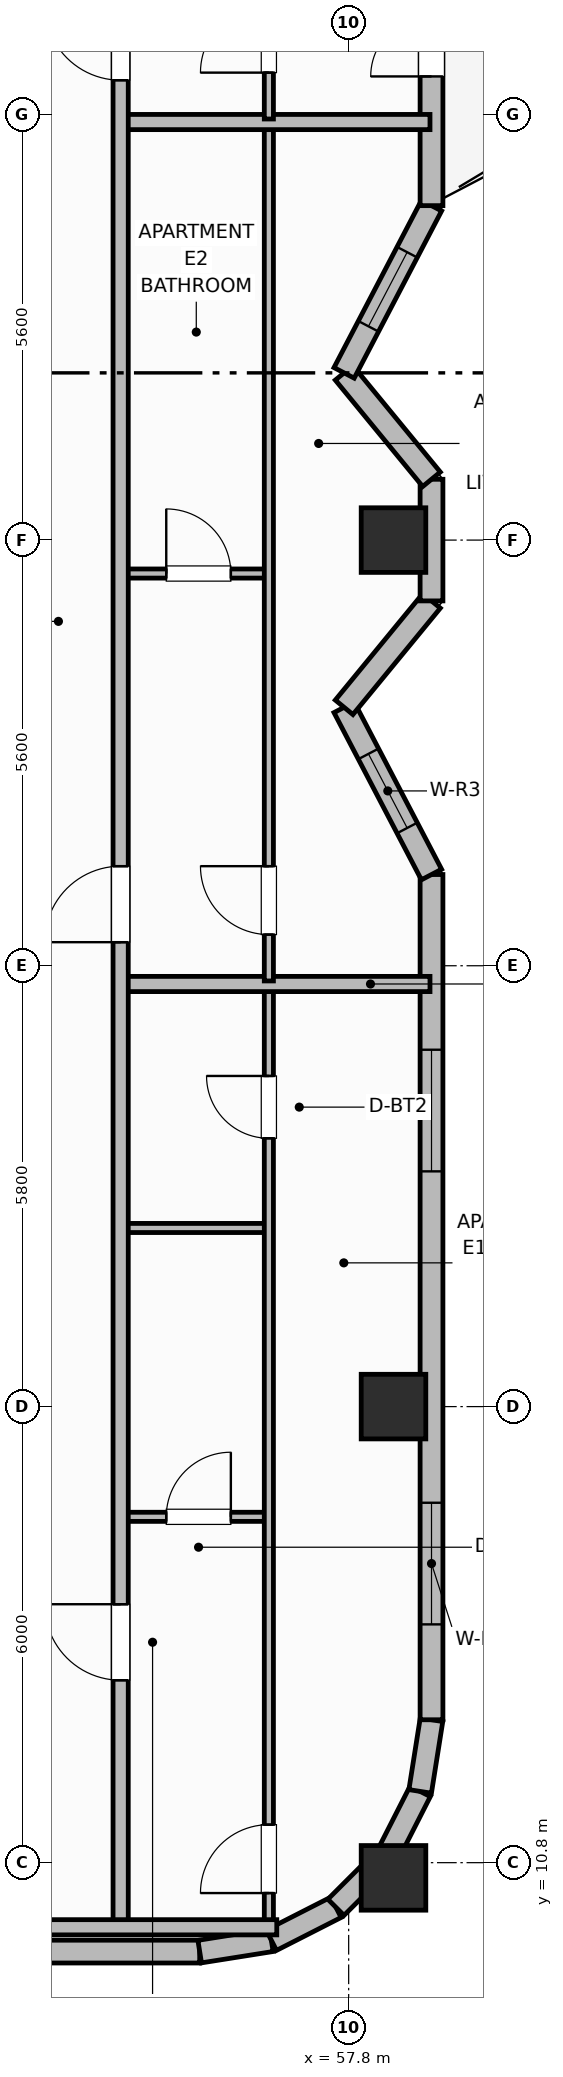
"""IFC4 building model, lengths in metres.
Left out: names, types, materials, properties, quantities, classifications, styles, units other than length and angle.
Written with IfcOpenShell. Run it as: python <this file> out.ifc"""

import sys

from ifc_helpers import new_model, si_unit, direction, frame, frame_2d, origin, origin_2d, place, context, subcontext, project, spatial, rectangle, extrude, element, fill, save


model = new_model("IFC4")
c1 = context("Model", 3, precision=1e-05, world=origin(), true_north=direction((0.0, 1.0)))
c2 = subcontext(c1, "Body", "Model", "MODEL_VIEW")
j1 = project(units=[si_unit("LENGTHUNIT", "METRE"), si_unit("PLANEANGLEUNIT", "RADIAN")], contexts=[c1])
p1 = place(None, origin())
s1 = spatial("IfcSite", under=j1, at=p1, CompositionType="ELEMENT")
p2 = place(p1, origin())
s2 = spatial("IfcBuilding", under=s1, at=p2, CompositionType="ELEMENT")
p3 = place(p2, frame((0.0, 0.0, 240.6)))
s3 = spatial("IfcBuildingStorey", under=s2, at=p3, CompositionType="ELEMENT", Elevation=240.6)
for number, where, z_axis, x_axis in (
    (1, (58.39, 10.6, 0.0), (0.0, 0.0, 1.0), (1.0, 0.0, 0.0)),
    (2, (58.39, 16.8, 0.0), (0.0, 0.0, 1.0), (1.0, 0.0, 0.0)),
    (3, (58.39, 28.2, 0.0), (0.0, 0.0, 1.0), (1.0, 0.0, 0.0)),
):
    element("IfcColumn", number, at=place(p3, frame(where, z_axis=z_axis, x_axis=x_axis)), inside=s3, PredefinedType="COLUMN", context=c2, shape_type="SweptSolid", body=[
        extrude(rectangle(XDim=0.85, YDim=0.85, at=origin_2d()), origin(), (0.0, 0.0, 1.0), 3.7),
    ])
p4 = place(p3, frame((22.56, 9.63, 0.0), z_axis=(0.0, 0.0, 1.0), x_axis=(1.0, 0.0, 0.0)))
e4 = element("IfcWall", 4, at=p4, inside=s3, PredefinedType="SOLIDWALL", context=c2, shape_type="SweptSolid", body=[
    extrude(rectangle(XDim=33.28, YDim=0.3, at=frame_2d((16.64, 0.0))), origin(), (0.0, 0.0, 1.0), 2.73),
])
p5 = place(p4, frame((5.08, 0.0, 0.76)))
e5 = element("IfcOpeningElement", 5, at=p5, cuts=e4, PredefinedType="OPENING", context=c2, shape_type="SweptSolid", body=[
    extrude(rectangle(XDim=1.8, YDim=1.85, at=frame_2d((0.9, 0.925))), frame((0.0, 0.16, 0.0), z_axis=(0.0, -1.0, 0.0), x_axis=(1.0, 0.0, 0.0)), (0.0, 0.0, 1.0), 0.32),
])
p6 = place(p4, frame((8.633, 0.0, 0.76)))
e6 = element("IfcOpeningElement", 6, at=p6, cuts=e4, PredefinedType="OPENING", context=c2, shape_type="SweptSolid", body=[
    extrude(rectangle(XDim=1.8, YDim=1.85, at=frame_2d((0.9, 0.925))), frame((0.0, 0.16, 0.0), z_axis=(0.0, -1.0, 0.0), x_axis=(1.0, 0.0, 0.0)), (0.0, 0.0, 1.0), 0.32),
])
p7 = place(p4, frame((15.74, 0.0, 0.76)))
e7 = element("IfcOpeningElement", 7, at=p7, cuts=e4, PredefinedType="OPENING", context=c2, shape_type="SweptSolid", body=[
    extrude(rectangle(XDim=1.8, YDim=1.85, at=frame_2d((0.9, 0.925))), frame((0.0, 0.16, 0.0), z_axis=(0.0, -1.0, 0.0), x_axis=(1.0, 0.0, 0.0)), (0.0, 0.0, 1.0), 0.32),
])
p8 = place(p4, frame((22.847, 0.0, 0.76)))
e8 = element("IfcOpeningElement", 8, at=p8, cuts=e4, PredefinedType="OPENING", context=c2, shape_type="SweptSolid", body=[
    extrude(rectangle(XDim=1.8, YDim=1.85, at=frame_2d((0.9, 0.925))), frame((0.0, 0.16, 0.0), z_axis=(0.0, -1.0, 0.0), x_axis=(1.0, 0.0, 0.0)), (0.0, 0.0, 1.0), 0.32),
])
p9 = place(p4, frame((26.4, 0.0, 0.76)))
e9 = element("IfcOpeningElement", 9, at=p9, cuts=e4, PredefinedType="OPENING", context=c2, shape_type="SweptSolid", body=[
    extrude(rectangle(XDim=1.8, YDim=1.85, at=frame_2d((0.9, 0.925))), frame((0.0, 0.16, 0.0), z_axis=(0.0, -1.0, 0.0), x_axis=(1.0, 0.0, 0.0)), (0.0, 0.0, 1.0), 0.32),
])
p10 = place(p3, frame((55.84, 9.63, 0.0), z_axis=(0.0, 0.0, 1.0), x_axis=(0.987663181641, 0.156593229835, 0.0)))
e10 = element("IfcWall", 10, at=p10, inside=s3, PredefinedType="SOLIDWALL", context=c2, shape_type="SweptSolid", body=[
    extrude(rectangle(XDim=0.954, YDim=0.3, at=frame_2d((0.477, 0.0))), origin(), (0.0, 0.0, 1.0), 2.73),
])
for number, where, z_axis, x_axis in (
    (11, (56.782, 9.779, 0.0), (0.0, 0.0, 1.0), (0.891, 0.454, 0.0)),
    (12, (57.633, 10.212, 0.0), (0.0, 0.0, 1.0), (0.707, 0.707, 0.0)),
    (13, (58.308, 10.887, 0.0), (0.0, 0.0, 1.0), (0.454, 0.891, 0.0)),
):
    element("IfcWall", number, at=place(p3, frame(where, z_axis=z_axis, x_axis=x_axis)), inside=s3, PredefinedType="SOLIDWALL", context=c2, shape_type="SweptSolid", body=[
        extrude(rectangle(XDim=0.954, YDim=0.3, at=frame_2d((0.477, 0.0))), origin(), (0.0, 0.0, 1.0), 2.73),
    ])
p11 = place(p3, frame((58.741, 11.738, 0.0), z_axis=(0.0, 0.0, 1.0), x_axis=(0.156343617883, 0.987702725088, 0.0)))
e14 = element("IfcWall", 14, at=p11, inside=s3, PredefinedType="SOLIDWALL", context=c2, shape_type="SweptSolid", body=[
    extrude(rectangle(XDim=0.954, YDim=0.3, at=frame_2d((0.477, 0.0))), origin(), (0.0, 0.0, 1.0), 2.73),
])
p12 = place(p3, frame((58.89, 12.68, 0.0), z_axis=(0.0, 0.0, 1.0), x_axis=(0.0, 1.0, 0.0)))
e15 = element("IfcWall", 15, at=p12, inside=s3, PredefinedType="SOLIDWALL", context=c2, shape_type="SweptSolid", body=[
    extrude(rectangle(XDim=11.12, YDim=0.3, at=frame_2d((5.56, 0.0))), origin(), (0.0, 0.0, 1.0), 2.73),
])
p13 = place(p12, frame((1.255, 0.0, 0.71)))
e16 = element("IfcOpeningElement", 16, at=p13, cuts=e15, PredefinedType="OPENING", context=c2, shape_type="SweptSolid", body=[
    extrude(rectangle(XDim=1.6, YDim=1.9, at=frame_2d((0.8, 0.95))), frame((0.0, 0.16, 0.0), z_axis=(0.0, -1.0, 0.0), x_axis=(1.0, 0.0, 0.0)), (0.0, 0.0, 1.0), 0.32),
])
p14 = place(p12, frame((7.215, 0.0, 0.71)))
e17 = element("IfcOpeningElement", 17, at=p14, cuts=e15, PredefinedType="OPENING", context=c2, shape_type="SweptSolid", body=[
    extrude(rectangle(XDim=1.6, YDim=1.9, at=frame_2d((0.8, 0.95))), frame((0.0, 0.16, 0.0), z_axis=(0.0, -1.0, 0.0), x_axis=(1.0, 0.0, 0.0)), (0.0, 0.0, 1.0), 0.32),
])
p15 = place(p3, frame((58.89, 23.8, 0.0), z_axis=(0.0, 0.0, 1.0), x_axis=(-0.46323138706, 0.886237373418, 0.0)))
e18 = element("IfcWall", 18, at=p15, inside=s3, PredefinedType="SOLIDWALL", context=c2, shape_type="SweptSolid", body=[
    extrude(rectangle(XDim=2.482, YDim=0.3, at=frame_2d((1.241, 0.0))), origin(), (0.0, 0.0, 1.0), 2.73),
])
p16 = place(p15, frame((0.691, 0.0, 0.92)))
e19 = element("IfcOpeningElement", 19, at=p16, cuts=e18, PredefinedType="OPENING", context=c2, shape_type="SweptSolid", body=[
    extrude(rectangle(XDim=1.1, YDim=1.65, at=frame_2d((0.55, 0.825))), frame((0.0, 0.16, 0.0), z_axis=(0.0, -1.0, 0.0), x_axis=(1.0, 0.0, 0.0)), (0.0, 0.0, 1.0), 0.32),
])
p17 = place(p3, frame((57.74, 26.0, 0.0), z_axis=(0.0, 0.0, 1.0), x_axis=(0.634733675645, 0.772730975827, 0.0)))
e20 = element("IfcWall", 20, at=p17, inside=s3, PredefinedType="SOLIDWALL", context=c2, shape_type="SweptSolid", body=[
    extrude(rectangle(XDim=1.812, YDim=0.3, at=frame_2d((0.906, 0.0))), origin(), (0.0, 0.0, 1.0), 2.73),
])
p18 = place(p3, frame((58.89, 27.4, 0.0), z_axis=(0.0, 0.0, 1.0), x_axis=(0.0, 1.0, 0.0)))
e21 = element("IfcWall", 21, at=p18, inside=s3, PredefinedType="SOLIDWALL", context=c2, shape_type="SweptSolid", body=[
    extrude(rectangle(XDim=1.6, YDim=0.3, at=frame_2d((0.8, 0.0))), origin(), (0.0, 0.0, 1.0), 2.73),
])
p19 = place(p3, frame((58.89, 29.0, 0.0), z_axis=(0.0, 0.0, 1.0), x_axis=(-0.634733675645, 0.772730975827, 0.0)))
e22 = element("IfcWall", 22, at=p19, inside=s3, PredefinedType="SOLIDWALL", context=c2, shape_type="SweptSolid", body=[
    extrude(rectangle(XDim=1.812, YDim=0.3, at=frame_2d((0.906, 0.0))), origin(), (0.0, 0.0, 1.0), 2.73),
])
p20 = place(p3, frame((57.74, 30.4, 0.0), z_axis=(0.0, 0.0, 1.0), x_axis=(0.463191013929, 0.88625847506, 0.0)))
e23 = element("IfcWall", 23, at=p20, inside=s3, PredefinedType="SOLIDWALL", context=c2, shape_type="SweptSolid", body=[
    extrude(rectangle(XDim=2.483, YDim=0.3, at=frame_2d((1.241, 0.0))), origin(), (0.0, 0.0, 1.0), 2.73),
])
p21 = place(p20, frame((0.691, 0.0, 0.92)))
e24 = element("IfcOpeningElement", 24, at=p21, cuts=e23, PredefinedType="OPENING", context=c2, shape_type="SweptSolid", body=[
    extrude(rectangle(XDim=1.1, YDim=1.65, at=frame_2d((0.55, 0.825))), frame((0.0, 0.16, 0.0), z_axis=(0.0, -1.0, 0.0), x_axis=(1.0, 0.0, 0.0)), (0.0, 0.0, 1.0), 0.32),
])
p22 = place(p3, frame((58.89, 32.6, 0.0), z_axis=(0.0, 0.0, 1.0), x_axis=(0.0, 1.0, 0.0)))
e25 = element("IfcWall", 25, at=p22, inside=s3, PredefinedType="SOLIDWALL", context=c2, shape_type="SweptSolid", body=[
    extrude(rectangle(XDim=11.12, YDim=0.3, at=frame_2d((5.56, 0.0))), origin(), (0.0, 0.0, 1.0), 2.73),
])
p23 = place(p22, frame((1.7, 0.0, 0.0)))
e26 = element("IfcOpeningElement", 26, at=p23, cuts=e25, PredefinedType="OPENING", context=c2, shape_type="SweptSolid", body=[
    extrude(rectangle(XDim=1.6, YDim=2.1, at=frame_2d((0.8, 1.05))), frame((0.0, 0.16, 0.0), z_axis=(0.0, -1.0, 0.0), x_axis=(1.0, 0.0, 0.0)), (0.0, 0.0, 1.0), 0.32),
])
p24 = place(p22, frame((4.16, 0.0, 0.76)))
e27 = element("IfcOpeningElement", 27, at=p24, cuts=e25, PredefinedType="OPENING", context=c2, shape_type="SweptSolid", body=[
    extrude(rectangle(XDim=1.4, YDim=1.85, at=frame_2d((0.7, 0.925))), frame((0.0, 0.16, 0.0), z_axis=(0.0, -1.0, 0.0), x_axis=(1.0, 0.0, 0.0)), (0.0, 0.0, 1.0), 0.32),
])
p25 = place(p22, frame((8.483, 0.0, 0.76)))
e28 = element("IfcOpeningElement", 28, at=p25, cuts=e25, PredefinedType="OPENING", context=c2, shape_type="SweptSolid", body=[
    extrude(rectangle(XDim=1.4, YDim=1.85, at=frame_2d((0.7, 0.925))), frame((0.0, 0.16, 0.0), z_axis=(0.0, -1.0, 0.0), x_axis=(1.0, 0.0, 0.0)), (0.0, 0.0, 1.0), 0.32),
])
p26 = place(p3, frame((54.8, 15.35, 0.0), z_axis=(0.0, 0.0, 1.0), x_axis=(1.0, 0.0, 0.0)))
e29 = element("IfcWall", 29, at=p26, inside=s3, PredefinedType="PARTITIONING", context=c2, shape_type="SweptSolid", body=[
    extrude(rectangle(XDim=1.95, YDim=0.12, at=frame_2d((0.975, 0.0))), origin(), (0.0, 0.0, 1.0), 2.56),
])
p27 = place(p26, frame((0.6, 0.0, 0.0)))
e30 = element("IfcOpeningElement", 30, at=p27, cuts=e29, PredefinedType="OPENING", context=c2, shape_type="SweptSolid", body=[
    extrude(rectangle(XDim=0.85, YDim=2.1, at=frame_2d((0.425, 1.05))), frame((0.0, 0.07, 0.0), z_axis=(0.0, -1.0, 0.0), x_axis=(1.0, 0.0, 0.0)), (0.0, 0.0, 1.0), 0.14),
])
p28 = place(p3, frame((54.8, 19.15, 0.0), z_axis=(0.0, 0.0, 1.0), x_axis=(1.0, 0.0, 0.0)))
e31 = element("IfcWall", 31, at=p28, inside=s3, PredefinedType="PARTITIONING", context=c2, shape_type="SweptSolid", body=[
    extrude(rectangle(XDim=1.95, YDim=0.12, at=frame_2d((0.975, 0.0))), origin(), (0.0, 0.0, 1.0), 2.56),
])
p29 = place(p3, frame((56.75, 9.99, 0.0), z_axis=(0.0, 0.0, 1.0), x_axis=(0.0, 1.0, 0.0)))
e32 = element("IfcWall", 32, at=p29, inside=s3, PredefinedType="PARTITIONING", context=c2, shape_type="SweptSolid", body=[
    extrude(rectangle(XDim=12.33, YDim=0.12, at=frame_2d((6.165, 0.0))), origin(), (0.0, 0.0, 1.0), 2.56),
])
p30 = place(p29, frame((0.41, 0.0, 0.0)))
e33 = element("IfcOpeningElement", 33, at=p30, cuts=e32, PredefinedType="OPENING", context=c2, shape_type="SweptSolid", body=[
    extrude(rectangle(XDim=0.9, YDim=2.1, at=frame_2d((0.45, 1.05))), frame((0.0, 0.07, 0.0), z_axis=(0.0, -1.0, 0.0), x_axis=(1.0, 0.0, 0.0)), (0.0, 0.0, 1.0), 0.14),
])
p31 = place(p29, frame((10.34, 0.0, 0.0)))
e34 = element("IfcOpeningElement", 34, at=p31, cuts=e32, PredefinedType="OPENING", context=c2, shape_type="SweptSolid", body=[
    extrude(rectangle(XDim=0.82, YDim=2.08, at=frame_2d((0.41, 1.04))), frame((0.0, 0.07, 0.0), z_axis=(0.0, -1.0, 0.0), x_axis=(1.0, 0.0, 0.0)), (0.0, 0.0, 1.0), 0.14),
])
p32 = place(p3, frame((54.8, 22.36, 0.0), z_axis=(0.0, 0.0, 1.0), x_axis=(1.0, 0.0, 0.0)))
e35 = element("IfcWall", 35, at=p32, inside=s3, PredefinedType="PARTITIONING", context=c2, shape_type="SweptSolid", body=[
    extrude(rectangle(XDim=4.07, YDim=0.2, at=frame_2d((2.035, 0.0))), origin(), (0.0, 0.0, 1.0), 2.56),
])
p33 = place(p3, frame((54.8, 27.76, 0.0), z_axis=(0.0, 0.0, 1.0), x_axis=(1.0, 0.0, 0.0)))
e36 = element("IfcWall", 36, at=p33, inside=s3, PredefinedType="PARTITIONING", context=c2, shape_type="SweptSolid", body=[
    extrude(rectangle(XDim=1.95, YDim=0.12, at=frame_2d((0.975, 0.0))), origin(), (0.0, 0.0, 1.0), 2.56),
])
p34 = place(p33, frame((0.6, 0.0, 0.0)))
e37 = element("IfcOpeningElement", 37, at=p34, cuts=e36, PredefinedType="OPENING", context=c2, shape_type="SweptSolid", body=[
    extrude(rectangle(XDim=0.85, YDim=2.1, at=frame_2d((0.425, 1.05))), frame((0.0, 0.07, 0.0), z_axis=(0.0, -1.0, 0.0), x_axis=(1.0, 0.0, 0.0)), (0.0, 0.0, 1.0), 0.14),
])
p35 = place(p3, frame((56.75, 22.4, 0.0), z_axis=(0.0, 0.0, 1.0), x_axis=(0.0, 1.0, 0.0)))
e38 = element("IfcWall", 38, at=p35, inside=s3, PredefinedType="PARTITIONING", context=c2, shape_type="SweptSolid", body=[
    extrude(rectangle(XDim=11.26, YDim=0.12, at=frame_2d((5.63, 0.0))), origin(), (0.0, 0.0, 1.0), 2.56),
])
p36 = place(p35, frame((0.61, 0.0, 0.0)))
e39 = element("IfcOpeningElement", 39, at=p36, cuts=e38, PredefinedType="OPENING", context=c2, shape_type="SweptSolid", body=[
    extrude(rectangle(XDim=0.9, YDim=2.1, at=frame_2d((0.45, 1.05))), frame((0.0, 0.07, 0.0), z_axis=(0.0, -1.0, 0.0), x_axis=(1.0, 0.0, 0.0)), (0.0, 0.0, 1.0), 0.14),
])
p37 = place(p3, frame((54.8, 33.7, 0.0), z_axis=(0.0, 0.0, 1.0), x_axis=(1.0, 0.0, 0.0)))
e40 = element("IfcWall", 40, at=p37, inside=s3, PredefinedType="PARTITIONING", context=c2, shape_type="SweptSolid", body=[
    extrude(rectangle(XDim=4.07, YDim=0.2, at=frame_2d((2.035, 0.0))), origin(), (0.0, 0.0, 1.0), 2.56),
])
p38 = place(p3, frame((56.75, 33.74, 0.0), z_axis=(0.0, 0.0, 1.0), x_axis=(0.0, 1.0, 0.0)))
e41 = element("IfcWall", 41, at=p38, inside=s3, PredefinedType="PARTITIONING", context=c2, shape_type="SweptSolid", body=[
    extrude(rectangle(XDim=12.67, YDim=0.12, at=frame_2d((6.335, 0.0))), origin(), (0.0, 0.0, 1.0), 2.56),
])
p39 = place(p38, frame((0.61, 0.0, 0.0)))
e42 = element("IfcOpeningElement", 42, at=p39, cuts=e41, PredefinedType="OPENING", context=c2, shape_type="SweptSolid", body=[
    extrude(rectangle(XDim=0.9, YDim=2.1, at=frame_2d((0.45, 1.05))), frame((0.0, 0.07, 0.0), z_axis=(0.0, -1.0, 0.0), x_axis=(1.0, 0.0, 0.0)), (0.0, 0.0, 1.0), 0.14),
])
p40 = place(p38, frame((10.51, 0.0, 0.0)))
e43 = element("IfcOpeningElement", 43, at=p40, cuts=e41, PredefinedType="OPENING", context=c2, shape_type="SweptSolid", body=[
    extrude(rectangle(XDim=0.82, YDim=2.08, at=frame_2d((0.41, 1.04))), frame((0.0, 0.07, 0.0), z_axis=(0.0, -1.0, 0.0), x_axis=(1.0, 0.0, 0.0)), (0.0, 0.0, 1.0), 0.14),
])
p41 = place(p3, frame((54.8, 9.95, 0.0), z_axis=(0.0, 0.0, 1.0), x_axis=(0.0, 1.0, 0.0)))
e44 = element("IfcWall", 44, at=p41, inside=s3, PredefinedType="PARTITIONING", context=c2, shape_type="SweptSolid", body=[
    extrude(rectangle(XDim=36.5, YDim=0.2, at=frame_2d((18.25, 0.0))), origin(), (0.0, 0.0, 1.0), 2.56),
])
p42 = place(p41, frame((3.25, 0.0, 0.0)))
e45 = element("IfcOpeningElement", 45, at=p42, cuts=e44, PredefinedType="OPENING", context=c2, shape_type="SweptSolid", body=[
    extrude(rectangle(XDim=1.0, YDim=2.15, at=frame_2d((0.5, 1.075))), frame((0.0, 0.11, 0.0), z_axis=(0.0, -1.0, 0.0), x_axis=(1.0, 0.0, 0.0)), (0.0, 0.0, 1.0), 0.22),
])
p43 = place(p41, frame((12.96, 0.0, 0.0)))
e46 = element("IfcOpeningElement", 46, at=p43, cuts=e44, PredefinedType="OPENING", context=c2, shape_type="SweptSolid", body=[
    extrude(rectangle(XDim=1.0, YDim=2.15, at=frame_2d((0.5, 1.075))), frame((0.0, 0.11, 0.0), z_axis=(0.0, -1.0, 0.0), x_axis=(1.0, 0.0, 0.0)), (0.0, 0.0, 1.0), 0.22),
])
p44 = place(p41, frame((24.3, 0.0, 0.0)))
e47 = element("IfcOpeningElement", 47, at=p44, cuts=e44, PredefinedType="OPENING", context=c2, shape_type="SweptSolid", body=[
    extrude(rectangle(XDim=1.0, YDim=2.15, at=frame_2d((0.5, 1.075))), frame((0.0, 0.11, 0.0), z_axis=(0.0, -1.0, 0.0), x_axis=(1.0, 0.0, 0.0)), (0.0, 0.0, 1.0), 0.22),
])
p45 = place(p3, frame((53.1, 9.95, 0.0), z_axis=(0.0, 0.0, 1.0), x_axis=(1.0, 0.0, 0.0)))
e48 = element("IfcWall", 48, at=p45, inside=s3, PredefinedType="PARTITIONING", context=c2, shape_type="SweptSolid", body=[
    extrude(rectangle(XDim=3.754, YDim=0.2, at=frame_2d((1.877, 0.0))), origin(), (0.0, 0.0, 1.0), 2.56),
])
p46 = place(p13, origin())
e49 = element("IfcWindow", 49, at=p46, inside=s3, PartitioningType="SINGLE_PANEL", PredefinedType="WINDOW", context=c2, shape_type="SweptSolid", body=[
    extrude(rectangle(XDim=1.6, YDim=1.9, at=frame_2d((0.8, 0.95))), frame((0.0, 0.03, 0.0), z_axis=(0.0, -1.0, 0.0), x_axis=(1.0, 0.0, 0.0)), (0.0, 0.0, 1.0), 0.06),
])
fill(e16, e49)
p47 = place(p14, origin())
e50 = element("IfcWindow", 50, at=p47, inside=s3, PartitioningType="SINGLE_PANEL", PredefinedType="WINDOW", context=c2, shape_type="SweptSolid", body=[
    extrude(rectangle(XDim=1.6, YDim=1.9, at=frame_2d((0.8, 0.95))), frame((0.0, 0.03, 0.0), z_axis=(0.0, -1.0, 0.0), x_axis=(1.0, 0.0, 0.0)), (0.0, 0.0, 1.0), 0.06),
])
fill(e17, e50)
p48 = place(p16, origin())
e51 = element("IfcWindow", 51, at=p48, inside=s3, PartitioningType="SINGLE_PANEL", PredefinedType="WINDOW", context=c2, shape_type="SweptSolid", body=[
    extrude(rectangle(XDim=1.1, YDim=1.65, at=frame_2d((0.55, 0.825))), frame((0.0, 0.03, 0.0), z_axis=(0.0, -1.0, 0.0), x_axis=(1.0, 0.0, 0.0)), (0.0, 0.0, 1.0), 0.06),
])
fill(e19, e51)
p49 = place(p21, origin())
e52 = element("IfcWindow", 52, at=p49, inside=s3, PartitioningType="SINGLE_PANEL", PredefinedType="WINDOW", context=c2, shape_type="SweptSolid", body=[
    extrude(rectangle(XDim=1.1, YDim=1.65, at=frame_2d((0.55, 0.825))), frame((0.0, 0.03, 0.0), z_axis=(0.0, -1.0, 0.0), x_axis=(1.0, 0.0, 0.0)), (0.0, 0.0, 1.0), 0.06),
])
fill(e24, e52)
p50 = place(p23, origin())
e53 = element("IfcDoor", 53, at=p50, inside=s3, OperationType="DOUBLE_DOOR_SINGLE_SWING", PredefinedType="DOOR", context=c2, shape_type="SweptSolid", body=[
    extrude(rectangle(XDim=1.6, YDim=2.1, at=frame_2d((0.8, 1.05))), frame((0.0, 0.025, 0.0), z_axis=(0.0, -1.0, 0.0), x_axis=(1.0, 0.0, 0.0)), (0.0, 0.0, 1.0), 0.05),
])
fill(e26, e53)
p51 = place(p27, origin())
e54 = element("IfcDoor", 54, at=p51, inside=s3, OperationType="SINGLE_SWING_RIGHT", PredefinedType="DOOR", context=c2, shape_type="SweptSolid", body=[
    extrude(rectangle(XDim=0.85, YDim=2.1, at=frame_2d((0.425, 1.05))), frame((0.0, 0.025, 0.0), z_axis=(0.0, -1.0, 0.0), x_axis=(1.0, 0.0, 0.0)), (0.0, 0.0, 1.0), 0.05),
])
fill(e30, e54)
p52 = place(p30, origin())
e55 = element("IfcDoor", 55, at=p52, inside=s3, OperationType="SINGLE_SWING_LEFT", PredefinedType="DOOR", context=c2, shape_type="SweptSolid", body=[
    extrude(rectangle(XDim=0.9, YDim=2.1, at=frame_2d((0.45, 1.05))), frame((0.0, 0.025, 0.0), z_axis=(0.0, -1.0, 0.0), x_axis=(1.0, 0.0, 0.0)), (0.0, 0.0, 1.0), 0.05),
])
fill(e33, e55)
p53 = place(p31, origin())
e56 = element("IfcDoor", 56, at=p53, inside=s3, OperationType="SINGLE_SWING_RIGHT", PredefinedType="DOOR", context=c2, shape_type="SweptSolid", body=[
    extrude(rectangle(XDim=0.82, YDim=2.08, at=frame_2d((0.41, 1.04))), frame((0.0, 0.025, 0.0), z_axis=(0.0, -1.0, 0.0), x_axis=(1.0, 0.0, 0.0)), (0.0, 0.0, 1.0), 0.05),
])
fill(e34, e56)
p54 = place(p34, origin())
e57 = element("IfcDoor", 57, at=p54, inside=s3, OperationType="SINGLE_SWING_LEFT", PredefinedType="DOOR", context=c2, shape_type="SweptSolid", body=[
    extrude(rectangle(XDim=0.85, YDim=2.1, at=frame_2d((0.425, 1.05))), frame((0.0, 0.025, 0.0), z_axis=(0.0, -1.0, 0.0), x_axis=(1.0, 0.0, 0.0)), (0.0, 0.0, 1.0), 0.05),
])
fill(e37, e57)
p55 = place(p36, origin())
e58 = element("IfcDoor", 58, at=p55, inside=s3, OperationType="SINGLE_SWING_RIGHT", PredefinedType="DOOR", context=c2, shape_type="SweptSolid", body=[
    extrude(rectangle(XDim=0.9, YDim=2.1, at=frame_2d((0.45, 1.05))), frame((0.0, 0.025, 0.0), z_axis=(0.0, -1.0, 0.0), x_axis=(1.0, 0.0, 0.0)), (0.0, 0.0, 1.0), 0.05),
])
fill(e39, e58)
p56 = place(p39, origin())
e59 = element("IfcDoor", 59, at=p56, inside=s3, OperationType="SINGLE_SWING_LEFT", PredefinedType="DOOR", context=c2, shape_type="SweptSolid", body=[
    extrude(rectangle(XDim=0.9, YDim=2.1, at=frame_2d((0.45, 1.05))), frame((0.0, 0.025, 0.0), z_axis=(0.0, -1.0, 0.0), x_axis=(1.0, 0.0, 0.0)), (0.0, 0.0, 1.0), 0.05),
])
fill(e42, e59)
p57 = place(p42, origin())
e60 = element("IfcDoor", 60, at=p57, inside=s3, OperationType="SINGLE_SWING_RIGHT", PredefinedType="DOOR", context=c2, shape_type="SweptSolid", body=[
    extrude(rectangle(XDim=1.0, YDim=2.15, at=frame_2d((0.5, 1.075))), frame((0.0, 0.025, 0.0), z_axis=(0.0, -1.0, 0.0), x_axis=(1.0, 0.0, 0.0)), (0.0, 0.0, 1.0), 0.05),
])
fill(e45, e60)
p58 = place(p43, origin())
e61 = element("IfcDoor", 61, at=p58, inside=s3, OperationType="SINGLE_SWING_LEFT", PredefinedType="DOOR", context=c2, shape_type="SweptSolid", body=[
    extrude(rectangle(XDim=1.0, YDim=2.15, at=frame_2d((0.5, 1.075))), frame((0.0, 0.025, 0.0), z_axis=(0.0, -1.0, 0.0), x_axis=(1.0, 0.0, 0.0)), (0.0, 0.0, 1.0), 0.05),
])
fill(e46, e61)
p59 = place(p44, origin())
e62 = element("IfcDoor", 62, at=p59, inside=s3, OperationType="SINGLE_SWING_RIGHT", PredefinedType="DOOR", context=c2, shape_type="SweptSolid", body=[
    extrude(rectangle(XDim=1.0, YDim=2.15, at=frame_2d((0.5, 1.075))), frame((0.0, 0.025, 0.0), z_axis=(0.0, -1.0, 0.0), x_axis=(1.0, 0.0, 0.0)), (0.0, 0.0, 1.0), 0.05),
])
fill(e47, e62)
save(model, sys.argv[1])
